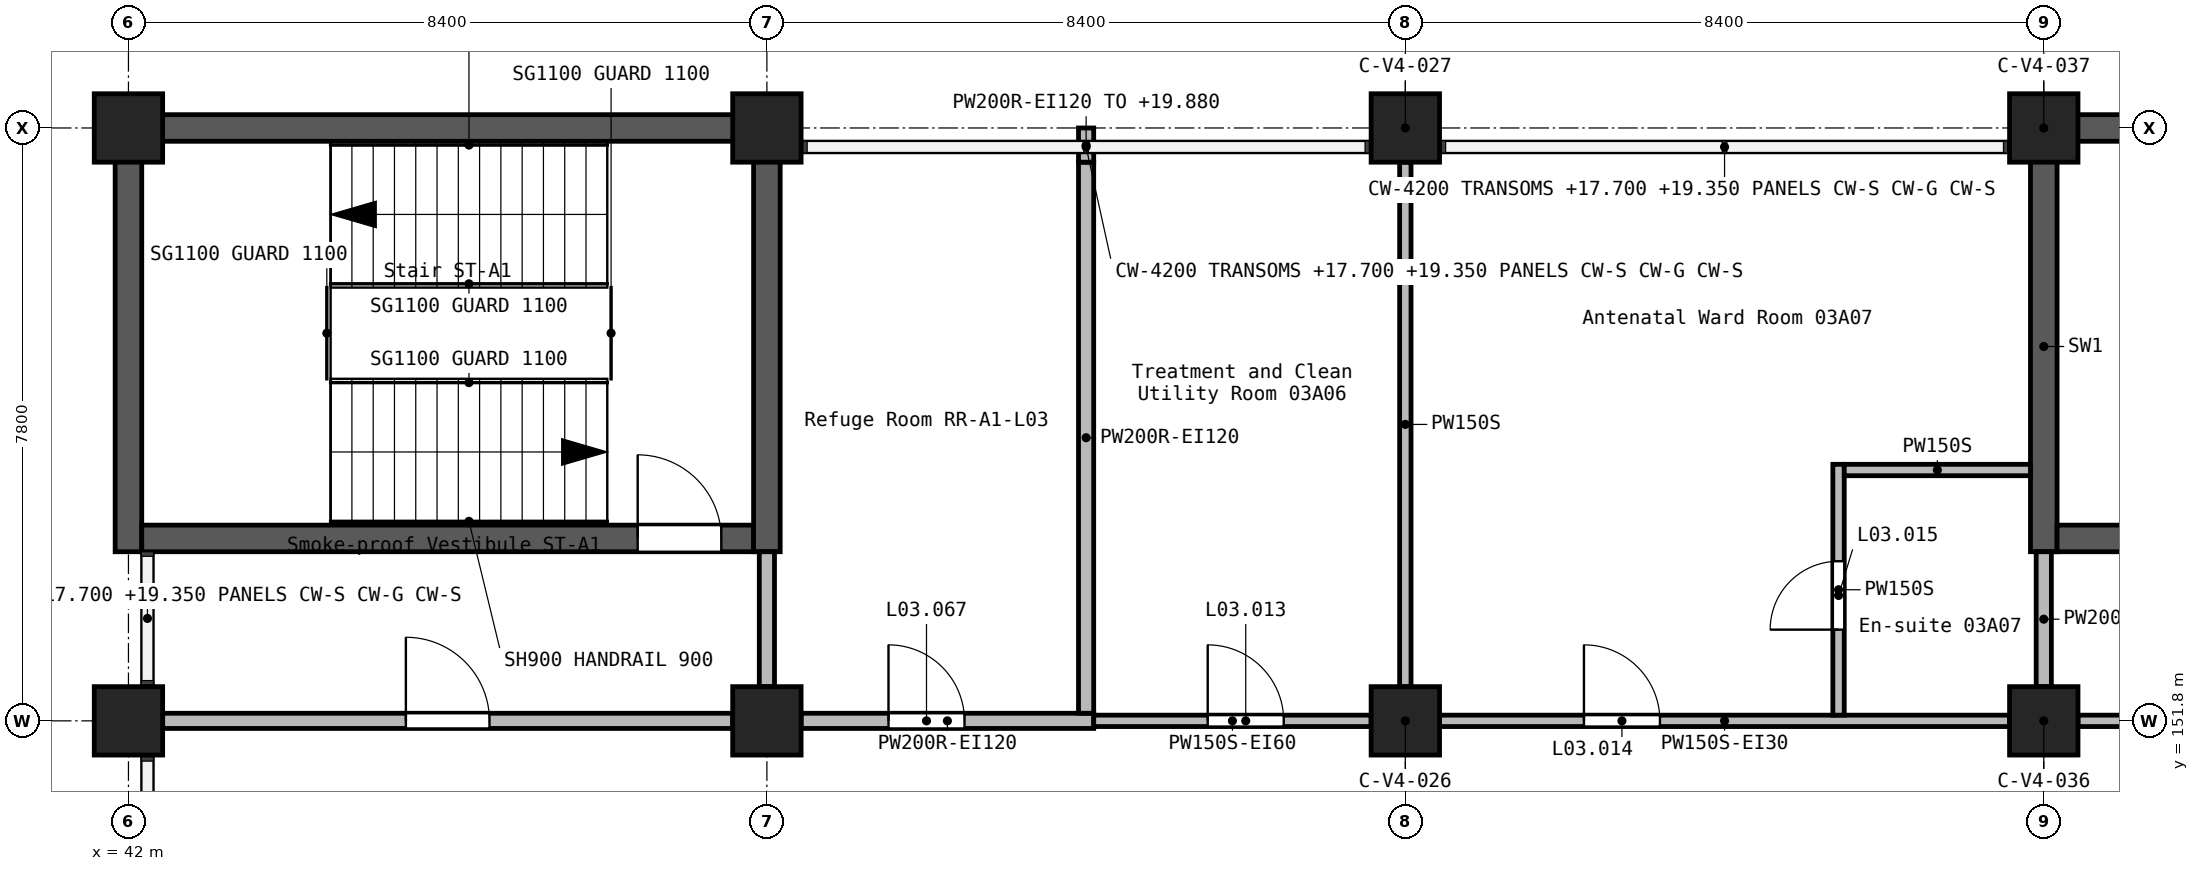
"""IFC4 building model, lengths in metres.
Left out: names, types, materials, properties, quantities, classifications, styles, units other than length and angle.
Written with IfcOpenShell. Run it as: python <this file> out.ifc"""

import sys

from ifc_helpers import new_model, si_unit, direction, frame, frame_2d, origin, origin_2d, place, context, subcontext, project, spatial, rectangle, extrude, element, fill, save


model = new_model("IFC4")
c1 = context("Model", 3, precision=1e-05, world=origin(), true_north=direction((0.0, 1.0)))
c2 = subcontext(c1, "Body", "Model", "MODEL_VIEW")
j1 = project(units=[si_unit("LENGTHUNIT", "METRE"), si_unit("PLANEANGLEUNIT", "RADIAN")], contexts=[c1])
p1 = place(None, origin())
s1 = spatial("IfcSite", under=j1, at=p1, CompositionType="ELEMENT")
p2 = place(p1, origin())
s2 = spatial("IfcBuilding", under=s1, at=p2, CompositionType="ELEMENT")
p3 = place(p2, frame((0.0, 0.0, 16.8)))
s3 = spatial("IfcBuildingStorey", under=s2, at=p3, CompositionType="ELEMENT", Elevation=16.8)
for number, where, z_axis, x_axis in (
    (1, (42.0, 151.8, 0.0), (0.0, 0.0, 1.0), (1.0, 0.0, 0.0)),
    (2, (42.0, 159.6, 0.0), (0.0, 0.0, 1.0), (1.0, 0.0, 0.0)),
    (3, (50.4, 151.8, 0.0), (0.0, 0.0, 1.0), (1.0, 0.0, 0.0)),
    (4, (50.4, 159.6, 0.0), (0.0, 0.0, 1.0), (1.0, 0.0, 0.0)),
    (5, (58.8, 151.8, 0.0), (0.0, 0.0, 1.0), (1.0, 0.0, 0.0)),
    (6, (58.8, 159.6, 0.0), (0.0, 0.0, 1.0), (1.0, 0.0, 0.0)),
    (7, (67.2, 151.8, 0.0), (0.0, 0.0, 1.0), (1.0, 0.0, 0.0)),
    (8, (67.2, 159.6, 0.0), (0.0, 0.0, 1.0), (1.0, 0.0, 0.0)),
):
    element("IfcColumn", number, at=place(p3, frame(where, z_axis=z_axis, x_axis=x_axis)), inside=s3, PredefinedType="COLUMN", context=c2, shape_type="SweptSolid", body=[
        extrude(rectangle(XDim=0.9, YDim=0.9, at=origin_2d()), origin(), (0.0, 0.0, 1.0), 4.2),
    ])
p4 = place(p3, frame((41.825, 159.6, 0.0), z_axis=(0.0, 0.0, 1.0), x_axis=(1.0, 0.0, 0.0)))
e9 = element("IfcWall", 9, at=p4, inside=s3, PredefinedType="SHEAR", context=c2, shape_type="SweptSolid", body=[
    extrude(rectangle(XDim=8.4, YDim=0.35, at=frame_2d((4.2, 0.0))), origin(), (0.0, 0.0, 1.0), 4.2),
])
p5 = place(p3, frame((42.0, 154.025, 0.0), z_axis=(0.0, 0.0, 1.0), x_axis=(0.0, 1.0, 0.0)))
e10 = element("IfcWall", 10, at=p5, inside=s3, PredefinedType="SHEAR", context=c2, shape_type="SweptSolid", body=[
    extrude(rectangle(XDim=5.4, YDim=0.35, at=frame_2d((2.7, 0.0))), origin(), (0.0, 0.0, 1.0), 4.2),
])
p6 = place(p3, frame((42.175, 154.2, 0.0), z_axis=(0.0, 0.0, 1.0), x_axis=(1.0, 0.0, 0.0)))
e11 = element("IfcWall", 11, at=p6, inside=s3, PredefinedType="SHEAR", context=c2, shape_type="SweptSolid", body=[
    extrude(rectangle(XDim=8.05, YDim=0.35, at=frame_2d((4.025, 0.0))), origin(), (0.0, 0.0, 1.0), 4.2),
])
p7 = place(p6, frame((6.525, 0.0, 0.0)))
e12 = element("IfcOpeningElement", 12, at=p7, cuts=e11, PredefinedType="OPENING", context=c2, shape_type="SweptSolid", body=[
    extrude(rectangle(XDim=1.1, YDim=2.1, at=frame_2d((0.55, 1.05))), frame((0.0, 0.185, 0.0), z_axis=(0.0, -1.0, 0.0), x_axis=(1.0, 0.0, 0.0)), (0.0, 0.0, 1.0), 0.37),
])
p8 = place(p3, frame((50.4, 154.025, 0.0), z_axis=(0.0, 0.0, 1.0), x_axis=(0.0, 1.0, 0.0)))
e13 = element("IfcWall", 13, at=p8, inside=s3, PredefinedType="SHEAR", context=c2, shape_type="SweptSolid", body=[
    extrude(rectangle(XDim=5.75, YDim=0.35, at=frame_2d((2.875, 0.0))), origin(), (0.0, 0.0, 1.0), 4.2),
])
p9 = place(p3, frame((67.025, 159.6, 0.0), z_axis=(0.0, 0.0, 1.0), x_axis=(1.0, 0.0, 0.0)))
e14 = element("IfcWall", 14, at=p9, inside=s3, PredefinedType="SHEAR", context=c2, shape_type="SweptSolid", body=[
    extrude(rectangle(XDim=2.975, YDim=0.35, at=frame_2d((1.488, 0.0))), origin(), (0.0, 0.0, 1.0), 3.9),
])
p10 = place(p3, frame((67.2, 154.025, 0.0), z_axis=(0.0, 0.0, 1.0), x_axis=(0.0, 1.0, 0.0)))
e15 = element("IfcWall", 15, at=p10, inside=s3, PredefinedType="SHEAR", context=c2, shape_type="SweptSolid", body=[
    extrude(rectangle(XDim=5.4, YDim=0.35, at=frame_2d((2.7, 0.0))), origin(), (0.0, 0.0, 1.0), 3.9),
])
p11 = place(p3, frame((67.375, 154.2, 0.0), z_axis=(0.0, 0.0, 1.0), x_axis=(1.0, 0.0, 0.0)))
e16 = element("IfcWall", 16, at=p11, inside=s3, PredefinedType="SHEAR", context=c2, shape_type="SweptSolid", body=[
    extrude(rectangle(XDim=2.625, YDim=0.35, at=frame_2d((1.312, 0.0))), origin(), (0.0, 0.0, 1.0), 3.9),
])
p12 = place(p3, frame((42.45, 151.8, 0.0), z_axis=(0.0, 0.0, 1.0), x_axis=(1.0, 0.0, 0.0)))
e17 = element("IfcWall", 17, at=p12, inside=s3, PredefinedType="SOLIDWALL", context=c2, shape_type="SweptSolid", body=[
    extrude(rectangle(XDim=7.5, YDim=0.2, at=frame_2d((3.75, 0.0))), origin(), (0.0, 0.0, 1.0), 3.9),
])
p13 = place(p12, frame((3.2, 0.0, 0.0)))
e18 = element("IfcOpeningElement", 18, at=p13, cuts=e17, PredefinedType="OPENING", context=c2, shape_type="SweptSolid", body=[
    extrude(rectangle(XDim=1.1, YDim=2.1, at=frame_2d((0.55, 1.05))), frame((0.0, 0.11, 0.0), z_axis=(0.0, -1.0, 0.0), x_axis=(1.0, 0.0, 0.0)), (0.0, 0.0, 1.0), 0.22),
])
p14 = place(p3, frame((50.85, 151.8, 0.0), z_axis=(0.0, 0.0, 1.0), x_axis=(1.0, 0.0, 0.0)))
e19 = element("IfcWall", 19, at=p14, inside=s3, PredefinedType="SOLIDWALL", context=c2, shape_type="SweptSolid", body=[
    extrude(rectangle(XDim=3.85, YDim=0.2, at=frame_2d((1.925, 0.0))), origin(), (0.0, 0.0, 1.0), 3.9),
])
p15 = place(p14, frame((1.15, 0.0, 0.0)))
e20 = element("IfcOpeningElement", 20, at=p15, cuts=e19, PredefinedType="OPENING", context=c2, shape_type="SweptSolid", body=[
    extrude(rectangle(XDim=1.0, YDim=2.1, at=frame_2d((0.5, 1.05))), frame((0.0, 0.11, 0.0), z_axis=(0.0, -1.0, 0.0), x_axis=(1.0, 0.0, 0.0)), (0.0, 0.0, 1.0), 0.22),
])
p16 = place(p3, frame((50.4, 152.25, 0.0), z_axis=(0.0, 0.0, 1.0), x_axis=(0.0, 1.0, 0.0)))
e21 = element("IfcWall", 21, at=p16, inside=s3, PredefinedType="SOLIDWALL", context=c2, shape_type="SweptSolid", body=[
    extrude(rectangle(XDim=1.775, YDim=0.2, at=frame_2d((0.887, 0.0))), origin(), (0.0, 0.0, 1.0), 3.9),
])
p17 = place(p3, frame((54.6, 151.9, 0.0), z_axis=(0.0, 0.0, 1.0), x_axis=(0.0, 1.0, 0.0)))
e22 = element("IfcWall", 22, at=p17, inside=s3, PredefinedType="SOLIDWALL", context=c2, shape_type="SweptSolid", body=[
    extrude(rectangle(XDim=7.25, YDim=0.2, at=frame_2d((3.625, 0.0))), origin(), (0.0, 0.0, 1.0), 3.9),
])
p18 = place(p3, frame((54.6, 159.15, 0.0), z_axis=(0.0, 0.0, 1.0), x_axis=(0.0, 1.0, 0.0)))
e23 = element("IfcWall", 23, at=p18, inside=s3, PredefinedType="SOLIDWALL", context=c2, shape_type="SweptSolid", body=[
    extrude(rectangle(XDim=0.45, YDim=0.2, at=frame_2d((0.225, 0.0))), origin(), (0.0, 0.0, 1.0), 3.08),
])
p19 = place(p3, frame((67.2, 152.25, 0.0), z_axis=(0.0, 0.0, 1.0), x_axis=(0.0, 1.0, 0.0)))
e24 = element("IfcWall", 24, at=p19, inside=s3, PredefinedType="SOLIDWALL", context=c2, shape_type="SweptSolid", body=[
    extrude(rectangle(XDim=1.775, YDim=0.2, at=frame_2d((0.887, 0.0))), origin(), (0.0, 0.0, 1.0), 3.9),
])
p20 = place(p3, frame((59.25, 151.8, 0.0), z_axis=(0.0, 0.0, 1.0), x_axis=(1.0, 0.0, 0.0)))
e25 = element("IfcWall", 25, at=p20, inside=s3, PredefinedType="PARTITIONING", context=c2, shape_type="SweptSolid", body=[
    extrude(rectangle(XDim=7.5, YDim=0.15, at=frame_2d((3.75, 0.0))), origin(), (0.0, 0.0, 1.0), 3.9),
])
p21 = place(p20, frame((1.9, 0.0, 0.0)))
e26 = element("IfcOpeningElement", 26, at=p21, cuts=e25, PredefinedType="OPENING", context=c2, shape_type="SweptSolid", body=[
    extrude(rectangle(XDim=1.0, YDim=2.1, at=frame_2d((0.5, 1.05))), frame((0.0, 0.085, 0.0), z_axis=(0.0, -1.0, 0.0), x_axis=(1.0, 0.0, 0.0)), (0.0, 0.0, 1.0), 0.17),
])
p22 = place(p3, frame((67.65, 151.8, 0.0), z_axis=(0.0, 0.0, 1.0), x_axis=(1.0, 0.0, 0.0)))
e27 = element("IfcWall", 27, at=p22, inside=s3, PredefinedType="PARTITIONING", context=c2, shape_type="SweptSolid", body=[
    extrude(rectangle(XDim=7.5, YDim=0.15, at=frame_2d((3.75, 0.0))), origin(), (0.0, 0.0, 1.0), 3.9),
])
p23 = place(p22, frame((3.25, 0.0, 0.0)))
e28 = element("IfcOpeningElement", 28, at=p23, cuts=e27, PredefinedType="OPENING", context=c2, shape_type="SweptSolid", body=[
    extrude(rectangle(XDim=1.0, YDim=2.1, at=frame_2d((0.5, 1.05))), frame((0.0, 0.085, 0.0), z_axis=(0.0, -1.0, 0.0), x_axis=(1.0, 0.0, 0.0)), (0.0, 0.0, 1.0), 0.17),
])
p24 = place(p3, frame((54.7, 151.8, 0.0), z_axis=(0.0, 0.0, 1.0), x_axis=(1.0, 0.0, 0.0)))
e29 = element("IfcWall", 29, at=p24, inside=s3, PredefinedType="PARTITIONING", context=c2, shape_type="SweptSolid", body=[
    extrude(rectangle(XDim=3.65, YDim=0.15, at=frame_2d((1.825, 0.0))), origin(), (0.0, 0.0, 1.0), 3.9),
])
p25 = place(p24, frame((1.5, 0.0, 0.0)))
e30 = element("IfcOpeningElement", 30, at=p25, cuts=e29, PredefinedType="OPENING", context=c2, shape_type="SweptSolid", body=[
    extrude(rectangle(XDim=1.0, YDim=2.1, at=frame_2d((0.5, 1.05))), frame((0.0, 0.085, 0.0), z_axis=(0.0, -1.0, 0.0), x_axis=(1.0, 0.0, 0.0)), (0.0, 0.0, 1.0), 0.17),
])
p26 = place(p3, frame((58.8, 152.25, 0.0), z_axis=(0.0, 0.0, 1.0), x_axis=(0.0, 1.0, 0.0)))
e31 = element("IfcWall", 31, at=p26, inside=s3, PredefinedType="PARTITIONING", context=c2, shape_type="SweptSolid", body=[
    extrude(rectangle(XDim=6.9, YDim=0.15, at=frame_2d((3.45, 0.0))), origin(), (0.0, 0.0, 1.0), 3.9),
])
p27 = place(p3, frame((64.5, 151.875, 0.0), z_axis=(0.0, 0.0, 1.0), x_axis=(0.0, 1.0, 0.0)))
e32 = element("IfcWall", 32, at=p27, inside=s3, PredefinedType="PARTITIONING", context=c2, shape_type="SweptSolid", body=[
    extrude(rectangle(XDim=3.3, YDim=0.15, at=frame_2d((1.65, 0.0))), origin(), (0.0, 0.0, 1.0), 3.9),
])
p28 = place(p27, frame((1.125, 0.0, 0.0)))
e33 = element("IfcOpeningElement", 33, at=p28, cuts=e32, PredefinedType="OPENING", context=c2, shape_type="SweptSolid", body=[
    extrude(rectangle(XDim=0.9, YDim=2.1, at=frame_2d((0.45, 1.05))), frame((0.0, 0.085, 0.0), z_axis=(0.0, -1.0, 0.0), x_axis=(1.0, 0.0, 0.0)), (0.0, 0.0, 1.0), 0.17),
])
p29 = place(p3, frame((64.575, 155.1, 0.0), z_axis=(0.0, 0.0, 1.0), x_axis=(1.0, 0.0, 0.0)))
e34 = element("IfcWall", 34, at=p29, inside=s3, PredefinedType="PARTITIONING", context=c2, shape_type="SweptSolid", body=[
    extrude(rectangle(XDim=2.45, YDim=0.15, at=frame_2d((1.225, 0.0))), origin(), (0.0, 0.0, 1.0), 3.9),
])
p30 = place(p25, origin())
e35 = element("IfcDoor", 35, at=p30, inside=s3, OperationType="SINGLE_SWING_RIGHT", PredefinedType="DOOR", context=c2, shape_type="SweptSolid", body=[
    extrude(rectangle(XDim=1.0, YDim=2.1, at=frame_2d((0.5, 1.05))), frame((0.0, 0.025, 0.0), z_axis=(0.0, -1.0, 0.0), x_axis=(1.0, 0.0, 0.0)), (0.0, 0.0, 1.0), 0.05),
])
fill(e30, e35)
p31 = place(p21, origin())
e36 = element("IfcDoor", 36, at=p31, inside=s3, OperationType="SINGLE_SWING_LEFT", PredefinedType="DOOR", context=c2, shape_type="SweptSolid", body=[
    extrude(rectangle(XDim=1.0, YDim=2.1, at=frame_2d((0.5, 1.05))), frame((0.0, 0.025, 0.0), z_axis=(0.0, -1.0, 0.0), x_axis=(1.0, 0.0, 0.0)), (0.0, 0.0, 1.0), 0.05),
])
fill(e26, e36)
p32 = place(p28, frame((0.9, 0.0, 0.0), z_axis=(0.0, 0.0, 1.0), x_axis=(-1.0, 0.0, 0.0)))
e37 = element("IfcDoor", 37, at=p32, inside=s3, OperationType="SINGLE_SWING_RIGHT", PredefinedType="DOOR", context=c2, shape_type="SweptSolid", body=[
    extrude(rectangle(XDim=0.9, YDim=2.1, at=frame_2d((0.45, 1.05))), frame((0.0, 0.025, 0.0), z_axis=(0.0, -1.0, 0.0), x_axis=(1.0, 0.0, 0.0)), (0.0, 0.0, 1.0), 0.05),
])
fill(e33, e37)
p33 = place(p15, origin())
e38 = element("IfcDoor", 38, at=p33, inside=s3, OperationType="SINGLE_SWING_LEFT", PredefinedType="DOOR", context=c2, shape_type="SweptSolid", body=[
    extrude(rectangle(XDim=1.0, YDim=2.1, at=frame_2d((0.5, 1.05))), frame((0.0, 0.025, 0.0), z_axis=(0.0, -1.0, 0.0), x_axis=(1.0, 0.0, 0.0)), (0.0, 0.0, 1.0), 0.05),
])
fill(e20, e38)
p34 = place(p7, origin())
e39 = element("IfcDoor", 39, at=p34, inside=s3, OperationType="SINGLE_SWING_RIGHT", PredefinedType="DOOR", context=c2, shape_type="SweptSolid", body=[
    extrude(rectangle(XDim=1.1, YDim=2.1, at=frame_2d((0.55, 1.05))), frame((0.0, 0.025, 0.0), z_axis=(0.0, -1.0, 0.0), x_axis=(1.0, 0.0, 0.0)), (0.0, 0.0, 1.0), 0.05),
])
fill(e12, e39)
p35 = place(p13, origin())
e40 = element("IfcDoor", 40, at=p35, inside=s3, OperationType="SINGLE_SWING_RIGHT", PredefinedType="DOOR", context=c2, shape_type="SweptSolid", body=[
    extrude(rectangle(XDim=1.1, YDim=2.1, at=frame_2d((0.55, 1.05))), frame((0.0, 0.025, 0.0), z_axis=(0.0, -1.0, 0.0), x_axis=(1.0, 0.0, 0.0)), (0.0, 0.0, 1.0), 0.05),
])
fill(e18, e40)
save(model, sys.argv[1])
